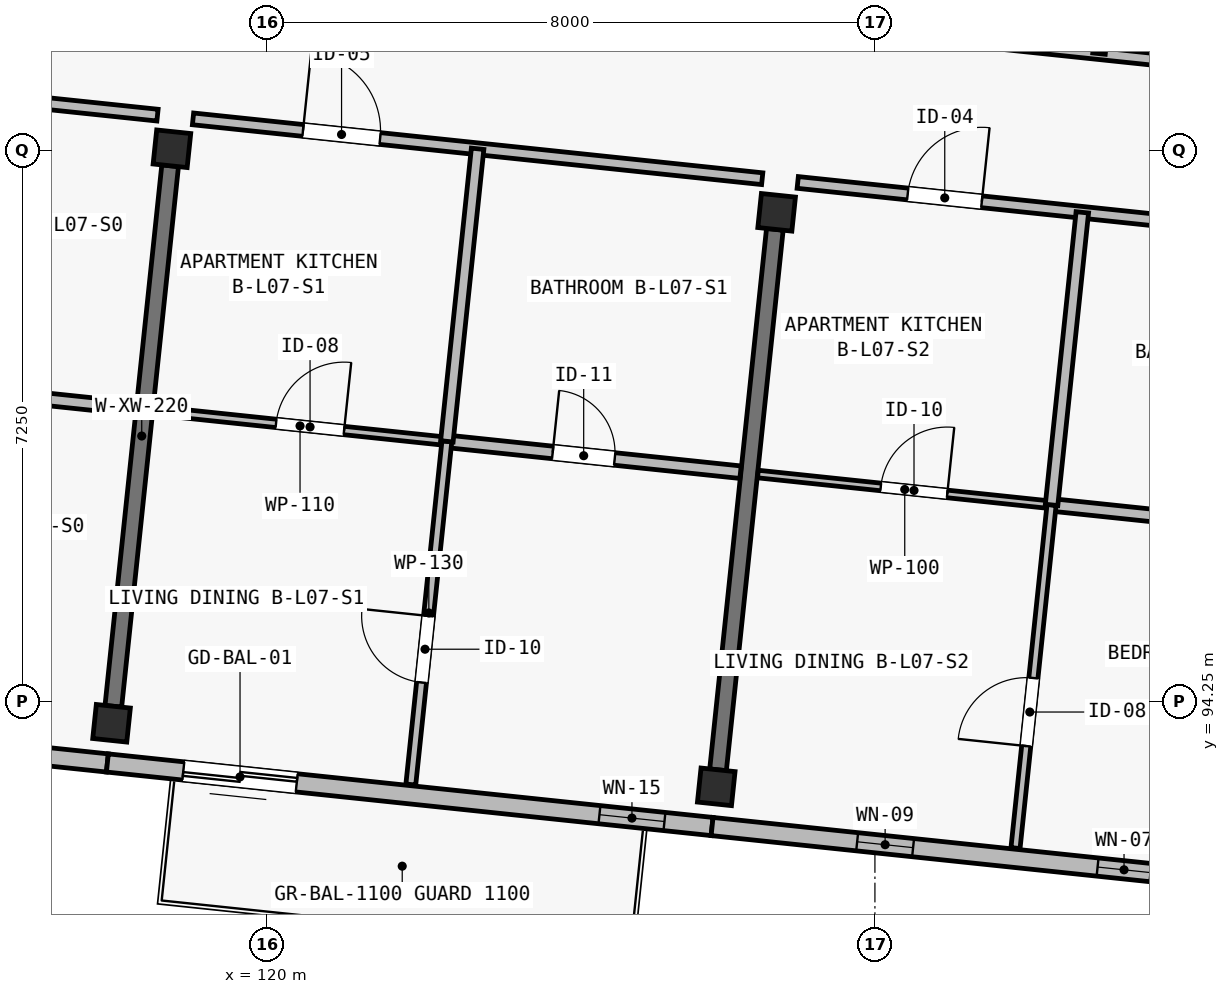
"""IFC4 building model, lengths in metres.
Left out: names, types, materials, properties, quantities, classifications, styles, units other than length and angle.
Written with IfcOpenShell. Run it as: python <this file> out.ifc"""

import sys

from ifc_helpers import new_model, si_unit, direction, frame, frame_2d, origin, origin_2d, place, context, subcontext, project, spatial, rectangle, extrude, element, fill, save


model = new_model("IFC4")
c1 = context("Model", 3, precision=1e-05, world=origin(), true_north=direction((0.0, 1.0)))
c2 = subcontext(c1, "Body", "Model", "MODEL_VIEW")
j1 = project(units=[si_unit("LENGTHUNIT", "METRE"), si_unit("PLANEANGLEUNIT", "RADIAN")], contexts=[c1])
p1 = place(None, origin())
s1 = spatial("IfcSite", under=j1, at=p1, CompositionType="ELEMENT")
p2 = place(p1, origin())
s2 = spatial("IfcBuilding", under=s1, at=p2, CompositionType="ELEMENT")
p3 = place(p2, frame((0.0, 0.0, 24.65)))
s3 = spatial("IfcBuildingStorey", under=s2, at=p3, CompositionType="ELEMENT", Elevation=24.65)
for number, where, z_axis, x_axis in (
    (1, (117.956, 93.964, 0.0), (0.0, 0.0, 1.0), (0.995, -0.105, 0.0)),
    (2, (118.75, 101.522, 0.0), (0.0, 0.0, 1.0), (0.995, -0.105, 0.0)),
    (3, (125.912, 93.127, 0.0), (0.0, 0.0, 1.0), (0.995, -0.105, 0.0)),
    (4, (126.707, 100.686, 0.0), (0.0, 0.0, 1.0), (0.995, -0.105, 0.0)),
):
    element("IfcColumn", number, at=place(p3, frame(where, z_axis=z_axis, x_axis=x_axis)), inside=s3, PredefinedType="COLUMN", context=c2, shape_type="SweptSolid", body=[
        extrude(rectangle(XDim=0.45, YDim=0.45, at=origin_2d()), origin(), (0.0, 0.0, 1.0), 3.25),
    ])
p4 = place(p3, frame((117.98, 94.188, 0.0), z_axis=(0.0, 0.0, 1.0), x_axis=(0.104519481265, 0.994522839374, 0.0)))
e5 = element("IfcWall", 5, at=p4, inside=s3, PredefinedType="SHEAR", context=c2, shape_type="SweptSolid", body=[
    extrude(rectangle(XDim=7.15, YDim=0.22, at=frame_2d((3.575, 0.0))), origin(), (0.0, 0.0, 1.0), 2.5),
])
p5 = place(p3, frame((125.936, 93.351, 0.0), z_axis=(0.0, 0.0, 1.0), x_axis=(0.104553253602, 0.994519289487, 0.0)))
e6 = element("IfcWall", 6, at=p5, inside=s3, PredefinedType="SHEAR", context=c2, shape_type="SweptSolid", body=[
    extrude(rectangle(XDim=7.15, YDim=0.22, at=frame_2d((3.575, 0.0))), origin(), (0.0, 0.0, 1.0), 2.5),
])
p6 = place(p3, frame((117.901, 93.442, 0.0), z_axis=(0.0, 0.0, 1.0), x_axis=(-0.994521760736, 0.104529744196, 0.0)))
e7 = element("IfcWall", 7, at=p6, inside=s3, PredefinedType="SOLIDWALL", context=c2, shape_type="SweptSolid", body=[
    extrude(rectangle(XDim=8.525, YDim=0.24, at=frame_2d((4.262, 0.0))), origin(), (0.0, 0.0, 1.0), 3.0),
])
p7 = place(p6, frame((1.235, 0.0, 0.48)))
e8 = element("IfcOpeningElement", 8, at=p7, cuts=e7, PredefinedType="OPENING", context=c2, shape_type="SweptSolid", body=[
    extrude(rectangle(XDim=0.78, YDim=2.2, at=frame_2d((0.39, 1.1))), frame((0.0, 0.135, 0.0), z_axis=(0.0, -1.0, 0.0), x_axis=(1.0, 0.0, 0.0)), (0.0, 0.0, 1.0), 0.27),
])
p8 = place(p6, frame((6.108, 0.0, 0.48)))
e9 = element("IfcOpeningElement", 9, at=p8, cuts=e7, PredefinedType="OPENING", context=c2, shape_type="SweptSolid", body=[
    extrude(rectangle(XDim=0.84, YDim=2.28, at=frame_2d((0.42, 1.14))), frame((0.0, 0.135, 0.0), z_axis=(0.0, -1.0, 0.0), x_axis=(1.0, 0.0, 0.0)), (0.0, 0.0, 1.0), 0.27),
])
p9 = place(p3, frame((125.857, 92.605, 0.0), z_axis=(0.0, 0.0, 1.0), x_axis=(-0.994522329422, 0.104524333444, 0.0)))
e10 = element("IfcWall", 10, at=p9, inside=s3, PredefinedType="SOLIDWALL", context=c2, shape_type="SweptSolid", body=[
    extrude(rectangle(XDim=8.0, YDim=0.24, at=frame_2d((4.0, 0.0))), origin(), (0.0, 0.0, 1.0), 3.0),
])
p10 = place(p9, frame((5.495, 0.0, 0.0)))
e11 = element("IfcOpeningElement", 11, at=p10, cuts=e10, PredefinedType="OPENING", context=c2, shape_type="SweptSolid", body=[
    extrude(rectangle(XDim=1.5, YDim=2.12, at=frame_2d((0.75, 1.06))), frame((0.0, 0.135, 0.0), z_axis=(0.0, -1.0, 0.0), x_axis=(1.0, 0.0, 0.0)), (0.0, 0.0, 1.0), 0.27),
])
p11 = place(p9, frame((0.63, 0.0, 0.5)))
e12 = element("IfcOpeningElement", 12, at=p11, cuts=e10, PredefinedType="OPENING", context=c2, shape_type="SweptSolid", body=[
    extrude(rectangle(XDim=0.86, YDim=2.36, at=frame_2d((0.43, 1.18))), frame((0.0, 0.135, 0.0), z_axis=(0.0, -1.0, 0.0), x_axis=(1.0, 0.0, 0.0)), (0.0, 0.0, 1.0), 0.27),
])
p12 = place(p3, frame((133.814, 91.769, 0.0), z_axis=(0.0, 0.0, 1.0), x_axis=(-0.994522662826, 0.104521161134, 0.0)))
e13 = element("IfcWall", 13, at=p12, inside=s3, PredefinedType="SOLIDWALL", context=c2, shape_type="SweptSolid", body=[
    extrude(rectangle(XDim=8.0, YDim=0.24, at=frame_2d((4.0, 0.0))), origin(), (0.0, 0.0, 1.0), 3.0),
])
p13 = place(p12, frame((0.61, 0.0, 0.42)))
e14 = element("IfcOpeningElement", 14, at=p13, cuts=e13, PredefinedType="OPENING", context=c2, shape_type="SweptSolid", body=[
    extrude(rectangle(XDim=0.68, YDim=2.24, at=frame_2d((0.34, 1.12))), frame((0.0, 0.135, 0.0), z_axis=(0.0, -1.0, 0.0), x_axis=(1.0, 0.0, 0.0)), (0.0, 0.0, 1.0), 0.27),
])
p14 = place(p12, frame((2.2, 0.0, 0.48)))
e15 = element("IfcOpeningElement", 15, at=p14, cuts=e13, PredefinedType="OPENING", context=c2, shape_type="SweptSolid", body=[
    extrude(rectangle(XDim=0.7, YDim=2.36, at=frame_2d((0.35, 1.18))), frame((0.0, 0.135, 0.0), z_axis=(0.0, -1.0, 0.0), x_axis=(1.0, 0.0, 0.0)), (0.0, 0.0, 1.0), 0.27),
])
p15 = place(p12, frame((5.341, 0.0, 0.42)))
e16 = element("IfcOpeningElement", 16, at=p15, cuts=e13, PredefinedType="OPENING", context=c2, shape_type="SweptSolid", body=[
    extrude(rectangle(XDim=0.74, YDim=2.26, at=frame_2d((0.37, 1.13))), frame((0.0, 0.135, 0.0), z_axis=(0.0, -1.0, 0.0), x_axis=(1.0, 0.0, 0.0)), (0.0, 0.0, 1.0), 0.27),
])
p16 = place(p3, frame((110.446, 102.817, 0.0), z_axis=(0.0, 0.0, 1.0), x_axis=(0.994520852686, -0.104538383252, 0.0)))
e17 = element("IfcWall", 17, at=p16, inside=s3, PredefinedType="PARTITIONING", context=c2, shape_type="SweptSolid", body=[
    extrude(rectangle(XDim=8.16, YDim=0.155, at=frame_2d((4.08, 0.0))), origin(), (0.0, 0.0, 1.0), 2.97),
])
p17 = place(p16, frame((2.085, 0.0, 0.0)))
e18 = element("IfcOpeningElement", 18, at=p17, cuts=e17, PredefinedType="OPENING", context=c2, shape_type="SweptSolid", body=[
    extrude(rectangle(XDim=0.98, YDim=2.15, at=frame_2d((0.49, 1.075))), frame((0.0, 0.093, 0.0), z_axis=(0.0, -1.0, 0.0), x_axis=(1.0, 0.0, 0.0)), (0.0, 0.0, 1.0), 0.185),
])
p18 = place(p3, frame((114.412, 98.509, 0.0), z_axis=(0.0, 0.0, 1.0), x_axis=(0.994524375082, -0.104504867671, 0.0)))
e19 = element("IfcWall", 19, at=p18, inside=s3, PredefinedType="PLUMBINGWALL", context=c2, shape_type="SweptSolid", body=[
    extrude(rectangle(XDim=3.885, YDim=0.165, at=frame_2d((1.942, 0.0))), origin(), (0.0, 0.0, 1.0), 2.97),
])
p19 = place(p18, frame((1.4, 0.0, 0.0)))
e20 = element("IfcOpeningElement", 20, at=p19, cuts=e19, PredefinedType="OPENING", context=c2, shape_type="SweptSolid", body=[
    extrude(rectangle(XDim=0.82, YDim=2.08, at=frame_2d((0.41, 1.04))), frame((0.0, 0.097, 0.0), z_axis=(0.0, -1.0, 0.0), x_axis=(1.0, 0.0, 0.0)), (0.0, 0.0, 1.0), 0.195),
])
p20 = place(p3, frame((119.028, 101.915, 0.0), z_axis=(0.0, 0.0, 1.0), x_axis=(0.994521430918, -0.10453288212, 0.0)))
e21 = element("IfcWall", 21, at=p20, inside=s3, PredefinedType="PARTITIONING", context=c2, shape_type="SweptSolid", body=[
    extrude(rectangle(XDim=7.53, YDim=0.155, at=frame_2d((3.765, 0.0))), origin(), (0.0, 0.0, 1.0), 2.97),
])
p21 = place(p20, frame((1.455, 0.0, 0.0)))
e22 = element("IfcOpeningElement", 22, at=p21, cuts=e21, PredefinedType="OPENING", context=c2, shape_type="SweptSolid", body=[
    extrude(rectangle(XDim=1.02, YDim=2.2, at=frame_2d((0.51, 1.1))), frame((0.0, 0.093, 0.0), z_axis=(0.0, -1.0, 0.0), x_axis=(1.0, 0.0, 0.0)), (0.0, 0.0, 1.0), 0.185),
])
p22 = place(p3, frame((118.504, 98.079, 0.0), z_axis=(0.0, 0.0, 1.0), x_axis=(0.994517841934, -0.104567021925, 0.0)))
e23 = element("IfcWall", 23, at=p22, inside=s3, PredefinedType="PARTITIONING", context=c2, shape_type="SweptSolid", body=[
    extrude(rectangle(XDim=3.885, YDim=0.11, at=frame_2d((1.942, 0.0))), origin(), (0.0, 0.0, 1.0), 2.97),
])
p23 = place(p22, frame((1.625, 0.0, 0.0)))
e24 = element("IfcOpeningElement", 24, at=p23, cuts=e23, PredefinedType="OPENING", context=c2, shape_type="SweptSolid", body=[
    extrude(rectangle(XDim=0.9, YDim=2.1, at=frame_2d((0.45, 1.05))), frame((0.0, 0.07, 0.0), z_axis=(0.0, -1.0, 0.0), x_axis=(1.0, 0.0, 0.0)), (0.0, 0.0, 1.0), 0.14),
])
p24 = place(p3, frame((122.368, 97.673, 0.0), z_axis=(0.0, 0.0, 1.0), x_axis=(0.994523688713, -0.104511399326, 0.0)))
e25 = element("IfcWall", 25, at=p24, inside=s3, PredefinedType="PLUMBINGWALL", context=c2, shape_type="SweptSolid", body=[
    extrude(rectangle(XDim=3.885, YDim=0.165, at=frame_2d((1.942, 0.0))), origin(), (0.0, 0.0, 1.0), 2.97),
])
p25 = place(p24, frame((1.4, 0.0, 0.0)))
e26 = element("IfcOpeningElement", 26, at=p25, cuts=e25, PredefinedType="OPENING", context=c2, shape_type="SweptSolid", body=[
    extrude(rectangle(XDim=0.82, YDim=2.08, at=frame_2d((0.41, 1.04))), frame((0.0, 0.097, 0.0), z_axis=(0.0, -1.0, 0.0), x_axis=(1.0, 0.0, 0.0)), (0.0, 0.0, 1.0), 0.195),
])
p26 = place(p3, frame((121.894, 93.158, 0.0), z_axis=(0.0, 0.0, 1.0), x_axis=(0.104539221709, 0.994520764552, 0.0)))
e27 = element("IfcWall", 27, at=p26, inside=s3, PredefinedType="PARTITIONING", context=c2, shape_type="SweptSolid", body=[
    extrude(rectangle(XDim=4.54, YDim=0.13, at=frame_2d((2.27, 0.0))), origin(), (0.0, 0.0, 1.0), 2.97),
])
p27 = place(p26, frame((1.35, 0.0, 0.0)))
e28 = element("IfcOpeningElement", 28, at=p27, cuts=e27, PredefinedType="OPENING", context=c2, shape_type="SweptSolid", body=[
    extrude(rectangle(XDim=0.88, YDim=2.1, at=frame_2d((0.44, 1.05))), frame((0.0, 0.08, 0.0), z_axis=(0.0, -1.0, 0.0), x_axis=(1.0, 0.0, 0.0)), (0.0, 0.0, 1.0), 0.16),
])
p28 = place(p3, frame((122.368, 97.673, 0.0), z_axis=(0.0, 0.0, 1.0), x_axis=(0.104468047647, 0.994528243451, 0.0)))
e29 = element("IfcWall", 29, at=p28, inside=s3, PredefinedType="PLUMBINGWALL", context=c2, shape_type="SweptSolid", body=[
    extrude(rectangle(XDim=3.87, YDim=0.165, at=frame_2d((1.935, 0.0))), origin(), (0.0, 0.0, 1.0), 2.97),
])
p29 = place(p3, frame((126.984, 101.079, 0.0), z_axis=(0.0, 0.0, 1.0), x_axis=(0.994521785195, -0.104529511491, 0.0)))
e30 = element("IfcWall", 30, at=p29, inside=s3, PredefinedType="PARTITIONING", context=c2, shape_type="SweptSolid", body=[
    extrude(rectangle(XDim=7.53, YDim=0.155, at=frame_2d((3.765, 0.0))), origin(), (0.0, 0.0, 1.0), 2.97),
])
p30 = place(p29, frame((1.455, 0.0, 0.0)))
e31 = element("IfcOpeningElement", 31, at=p30, cuts=e30, PredefinedType="OPENING", context=c2, shape_type="SweptSolid", body=[
    extrude(rectangle(XDim=0.98, YDim=2.15, at=frame_2d((0.49, 1.075))), frame((0.0, 0.093, 0.0), z_axis=(0.0, -1.0, 0.0), x_axis=(1.0, 0.0, 0.0)), (0.0, 0.0, 1.0), 0.185),
])
p31 = place(p3, frame((126.46, 97.243, 0.0), z_axis=(0.0, 0.0, 1.0), x_axis=(0.994524375082, -0.104504867671, 0.0)))
e32 = element("IfcWall", 32, at=p31, inside=s3, PredefinedType="PARTITIONING", context=c2, shape_type="SweptSolid", body=[
    extrude(rectangle(XDim=3.885, YDim=0.1, at=frame_2d((1.942, 0.0))), origin(), (0.0, 0.0, 1.0), 2.97),
])
p32 = place(p31, frame((1.625, 0.0, 0.0)))
e33 = element("IfcOpeningElement", 33, at=p32, cuts=e32, PredefinedType="OPENING", context=c2, shape_type="SweptSolid", body=[
    extrude(rectangle(XDim=0.88, YDim=2.1, at=frame_2d((0.44, 1.05))), frame((0.0, 0.065, 0.0), z_axis=(0.0, -1.0, 0.0), x_axis=(1.0, 0.0, 0.0)), (0.0, 0.0, 1.0), 0.13),
])
p33 = place(p3, frame((130.324, 96.837, 0.0), z_axis=(0.0, 0.0, 1.0), x_axis=(0.994524375082, -0.104504867671, 0.0)))
e34 = element("IfcWall", 34, at=p33, inside=s3, PredefinedType="PLUMBINGWALL", context=c2, shape_type="SweptSolid", body=[
    extrude(rectangle(XDim=3.885, YDim=0.165, at=frame_2d((1.942, 0.0))), origin(), (0.0, 0.0, 1.0), 2.97),
])
p34 = place(p33, frame((1.4, 0.0, 0.0)))
e35 = element("IfcOpeningElement", 35, at=p34, cuts=e34, PredefinedType="OPENING", context=c2, shape_type="SweptSolid", body=[
    extrude(rectangle(XDim=0.82, YDim=2.08, at=frame_2d((0.41, 1.04))), frame((0.0, 0.097, 0.0), z_axis=(0.0, -1.0, 0.0), x_axis=(1.0, 0.0, 0.0)), (0.0, 0.0, 1.0), 0.195),
])
p35 = place(p3, frame((129.85, 92.322, 0.0), z_axis=(0.0, 0.0, 1.0), x_axis=(0.104539221709, 0.994520764552, 0.0)))
e36 = element("IfcWall", 36, at=p35, inside=s3, PredefinedType="PARTITIONING", context=c2, shape_type="SweptSolid", body=[
    extrude(rectangle(XDim=4.54, YDim=0.12, at=frame_2d((2.27, 0.0))), origin(), (0.0, 0.0, 1.0), 2.97),
])
p36 = place(p35, frame((1.35, 0.0, 0.0)))
e37 = element("IfcOpeningElement", 37, at=p36, cuts=e36, PredefinedType="OPENING", context=c2, shape_type="SweptSolid", body=[
    extrude(rectangle(XDim=0.9, YDim=2.1, at=frame_2d((0.45, 1.05))), frame((0.0, 0.075, 0.0), z_axis=(0.0, -1.0, 0.0), x_axis=(1.0, 0.0, 0.0)), (0.0, 0.0, 1.0), 0.15),
])
p37 = place(p3, frame((130.324, 96.837, 0.0), z_axis=(0.0, 0.0, 1.0), x_axis=(0.104530443122, 0.994521687275, 0.0)))
e38 = element("IfcWall", 38, at=p37, inside=s3, PredefinedType="PLUMBINGWALL", context=c2, shape_type="SweptSolid", body=[
    extrude(rectangle(XDim=3.87, YDim=0.165, at=frame_2d((1.935, 0.0))), origin(), (0.0, 0.0, 1.0), 2.97),
])
p38 = place(p3, frame((127.358, 103.151, 0.0), z_axis=(0.0, 0.0, 1.0), x_axis=(0.994522671024, -0.104521083137, 0.0)))
e39 = element("IfcWall", 39, at=p38, inside=s3, PredefinedType="PARTITIONING", context=c2, shape_type="SweptSolid", body=[
    extrude(rectangle(XDim=7.22, YDim=0.155, at=frame_2d((3.61, 0.0))), origin(), (0.0, 0.0, 1.0), 2.97),
])
p39 = place(p38, frame((1.305, 0.0, 0.0)))
e40 = element("IfcOpeningElement", 40, at=p39, cuts=e39, PredefinedType="OPENING", context=c2, shape_type="SweptSolid", body=[
    extrude(rectangle(XDim=0.98, YDim=2.15, at=frame_2d((0.49, 1.075))), frame((0.0, 0.093, 0.0), z_axis=(0.0, -1.0, 0.0), x_axis=(1.0, 0.0, 0.0)), (0.0, 0.0, 1.0), 0.185),
])
p40 = place(p3, frame((130.948, 102.774, 0.0), z_axis=(0.0, 0.0, 1.0), x_axis=(0.104537578263, 0.994520937301, 0.0)))
e41 = element("IfcWall", 41, at=p40, inside=s3, PredefinedType="PLUMBINGWALL", context=c2, shape_type="SweptSolid", body=[
    extrude(rectangle(XDim=5.18, YDim=0.165, at=frame_2d((2.59, 0.0))), origin(), (0.0, 0.0, 1.0), 2.97),
])
p41 = place(p10, origin())
e42 = element("IfcDoor", 42, at=p41, inside=s3, OperationType="SLIDING_TO_RIGHT", PredefinedType="DOOR", context=c2, shape_type="SweptSolid", body=[
    extrude(rectangle(XDim=1.5, YDim=2.12, at=frame_2d((0.75, 1.06))), frame((0.0, 0.025, 0.0), z_axis=(0.0, -1.0, 0.0), x_axis=(1.0, 0.0, 0.0)), (0.0, 0.0, 1.0), 0.05),
])
fill(e11, e42)
p42 = place(p11, origin())
e43 = element("IfcWindow", 43, at=p42, inside=s3, PartitioningType="SINGLE_PANEL", PredefinedType="WINDOW", context=c2, shape_type="SweptSolid", body=[
    extrude(rectangle(XDim=0.86, YDim=2.36, at=frame_2d((0.43, 1.18))), frame((0.0, 0.03, 0.0), z_axis=(0.0, -1.0, 0.0), x_axis=(1.0, 0.0, 0.0)), (0.0, 0.0, 1.0), 0.06),
])
fill(e12, e43)
p43 = place(p14, origin())
e44 = element("IfcWindow", 44, at=p43, inside=s3, PartitioningType="SINGLE_PANEL", PredefinedType="WINDOW", context=c2, shape_type="SweptSolid", body=[
    extrude(rectangle(XDim=0.7, YDim=2.36, at=frame_2d((0.35, 1.18))), frame((0.0, 0.03, 0.0), z_axis=(0.0, -1.0, 0.0), x_axis=(1.0, 0.0, 0.0)), (0.0, 0.0, 1.0), 0.06),
])
fill(e15, e44)
p44 = place(p15, origin())
e45 = element("IfcWindow", 45, at=p44, inside=s3, PartitioningType="SINGLE_PANEL", PredefinedType="WINDOW", context=c2, shape_type="SweptSolid", body=[
    extrude(rectangle(XDim=0.74, YDim=2.26, at=frame_2d((0.37, 1.13))), frame((0.0, 0.03, 0.0), z_axis=(0.0, -1.0, 0.0), x_axis=(1.0, 0.0, 0.0)), (0.0, 0.0, 1.0), 0.06),
])
fill(e16, e45)
p45 = place(p21, origin())
e46 = element("IfcDoor", 46, at=p45, inside=s3, OperationType="SINGLE_SWING_LEFT", PredefinedType="DOOR", context=c2, shape_type="SweptSolid", body=[
    extrude(rectangle(XDim=1.02, YDim=2.2, at=frame_2d((0.51, 1.1))), frame((0.0, 0.025, 0.0), z_axis=(0.0, -1.0, 0.0), x_axis=(1.0, 0.0, 0.0)), (0.0, 0.0, 1.0), 0.05),
])
fill(e22, e46)
p46 = place(p23, origin())
e47 = element("IfcDoor", 47, at=p46, inside=s3, OperationType="SINGLE_SWING_RIGHT", PredefinedType="DOOR", context=c2, shape_type="SweptSolid", body=[
    extrude(rectangle(XDim=0.9, YDim=2.1, at=frame_2d((0.45, 1.05))), frame((0.0, 0.025, 0.0), z_axis=(0.0, -1.0, 0.0), x_axis=(1.0, 0.0, 0.0)), (0.0, 0.0, 1.0), 0.05),
])
fill(e24, e47)
p47 = place(p25, origin())
e48 = element("IfcDoor", 48, at=p47, inside=s3, OperationType="SINGLE_SWING_LEFT", PredefinedType="DOOR", context=c2, shape_type="SweptSolid", body=[
    extrude(rectangle(XDim=0.82, YDim=2.08, at=frame_2d((0.41, 1.04))), frame((0.0, 0.025, 0.0), z_axis=(0.0, -1.0, 0.0), x_axis=(1.0, 0.0, 0.0)), (0.0, 0.0, 1.0), 0.05),
])
fill(e26, e48)
p48 = place(p27, origin())
e49 = element("IfcDoor", 49, at=p48, inside=s3, OperationType="SINGLE_SWING_RIGHT", PredefinedType="DOOR", context=c2, shape_type="SweptSolid", body=[
    extrude(rectangle(XDim=0.88, YDim=2.1, at=frame_2d((0.44, 1.05))), frame((0.0, 0.025, 0.0), z_axis=(0.0, -1.0, 0.0), x_axis=(1.0, 0.0, 0.0)), (0.0, 0.0, 1.0), 0.05),
])
fill(e28, e49)
p49 = place(p30, origin())
e50 = element("IfcDoor", 50, at=p49, inside=s3, OperationType="SINGLE_SWING_RIGHT", PredefinedType="DOOR", context=c2, shape_type="SweptSolid", body=[
    extrude(rectangle(XDim=0.98, YDim=2.15, at=frame_2d((0.49, 1.075))), frame((0.0, 0.025, 0.0), z_axis=(0.0, -1.0, 0.0), x_axis=(1.0, 0.0, 0.0)), (0.0, 0.0, 1.0), 0.05),
])
fill(e31, e50)
p50 = place(p32, origin())
e51 = element("IfcDoor", 51, at=p50, inside=s3, OperationType="SINGLE_SWING_RIGHT", PredefinedType="DOOR", context=c2, shape_type="SweptSolid", body=[
    extrude(rectangle(XDim=0.88, YDim=2.1, at=frame_2d((0.44, 1.05))), frame((0.0, 0.025, 0.0), z_axis=(0.0, -1.0, 0.0), x_axis=(1.0, 0.0, 0.0)), (0.0, 0.0, 1.0), 0.05),
])
fill(e33, e51)
p51 = place(p36, origin())
e52 = element("IfcDoor", 52, at=p51, inside=s3, OperationType="SINGLE_SWING_LEFT", PredefinedType="DOOR", context=c2, shape_type="SweptSolid", body=[
    extrude(rectangle(XDim=0.9, YDim=2.1, at=frame_2d((0.45, 1.05))), frame((0.0, 0.025, 0.0), z_axis=(0.0, -1.0, 0.0), x_axis=(1.0, 0.0, 0.0)), (0.0, 0.0, 1.0), 0.05),
])
fill(e37, e52)
save(model, sys.argv[1])
